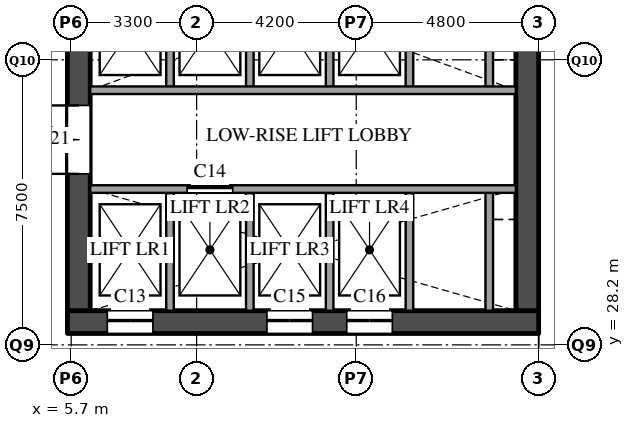
"""IFC4 building model, lengths in metres.
Left out: names, types, materials, properties, quantities, classifications, styles, units other than length and angle.
Written with IfcOpenShell. Run it as: python <this file> out.ifc"""

import sys

from ifc_helpers import new_model, si_unit, direction, frame, frame_2d, origin, place, context, subcontext, project, spatial, rectangle, extrude, element, fill, save


model = new_model("IFC4")
c1 = context("Model", 3, precision=1e-05, world=origin(), true_north=direction((0.0, 1.0)))
c2 = subcontext(c1, "Body", "Model", "MODEL_VIEW")
j1 = project(units=[si_unit("LENGTHUNIT", "METRE"), si_unit("PLANEANGLEUNIT", "RADIAN")], contexts=[c1])
p1 = place(None, origin())
s1 = spatial("IfcSite", under=j1, at=p1, CompositionType="ELEMENT")
p2 = place(p1, origin())
s2 = spatial("IfcBuilding", under=s1, at=p2, CompositionType="ELEMENT")
p3 = place(p2, frame((0.0, 0.0, 8.0)))
s3 = spatial("IfcBuildingStorey", under=s2, at=p3, CompositionType="ELEMENT", Elevation=8.0)
p4 = place(p3, frame((5.6, 28.8, 0.0), z_axis=(0.0, 0.0, 1.0), x_axis=(1.0, 0.0, 0.0)))
e1 = element("IfcWall", 1, at=p4, inside=s3, PredefinedType="SHEAR", context=c2, shape_type="SweptSolid", body=[
    extrude(rectangle(XDim=12.4, YDim=0.6, at=frame_2d((6.2, 0.0))), origin(), (0.0, 0.0, 1.0), 5.59),
])
p5 = place(p4, frame((1.05, 0.0, 0.0)))
e2 = element("IfcOpeningElement", 2, at=p5, cuts=e1, PredefinedType="OPENING", context=c2, shape_type="SweptSolid", body=[
    extrude(rectangle(XDim=1.2, YDim=2.1, at=frame_2d((0.6, 1.05))), frame((0.0, 0.31, 0.0), z_axis=(0.0, -1.0, 0.0), x_axis=(1.0, 0.0, 0.0)), (0.0, 0.0, 1.0), 0.62),
])
p6 = place(p4, frame((5.25, 0.0, 0.0)))
e3 = element("IfcOpeningElement", 3, at=p6, cuts=e1, PredefinedType="OPENING", context=c2, shape_type="SweptSolid", body=[
    extrude(rectangle(XDim=1.2, YDim=2.1, at=frame_2d((0.6, 1.05))), frame((0.0, 0.31, 0.0), z_axis=(0.0, -1.0, 0.0), x_axis=(1.0, 0.0, 0.0)), (0.0, 0.0, 1.0), 0.62),
])
p7 = place(p4, frame((7.35, 0.0, 0.0)))
e4 = element("IfcOpeningElement", 4, at=p7, cuts=e1, PredefinedType="OPENING", context=c2, shape_type="SweptSolid", body=[
    extrude(rectangle(XDim=1.2, YDim=2.1, at=frame_2d((0.6, 1.05))), frame((0.0, 0.31, 0.0), z_axis=(0.0, -1.0, 0.0), x_axis=(1.0, 0.0, 0.0)), (0.0, 0.0, 1.0), 0.62),
])
p8 = place(p3, frame((5.9, 29.1, 0.0), z_axis=(0.0, 0.0, 1.0), x_axis=(0.0, 1.0, 0.0)))
e5 = element("IfcWall", 5, at=p8, inside=s3, PredefinedType="SHEAR", context=c2, shape_type="SweptSolid", body=[
    extrude(rectangle(XDim=20.3, YDim=0.6, at=frame_2d((10.15, 0.0))), origin(), (0.0, 0.0, 1.0), 5.59),
])
p9 = place(p8, frame((3.6, 0.0, 0.0)))
e6 = element("IfcOpeningElement", 6, at=p9, cuts=e5, PredefinedType="OPENING", context=c2, shape_type="SweptSolid", body=[
    extrude(rectangle(XDim=1.8, YDim=2.1, at=frame_2d((0.9, 1.05))), frame((0.0, 0.31, 0.0), z_axis=(0.0, -1.0, 0.0), x_axis=(1.0, 0.0, 0.0)), (0.0, 0.0, 1.0), 0.62),
])
p10 = place(p8, frame((16.4, 0.0, 0.0)))
e7 = element("IfcOpeningElement", 7, at=p10, cuts=e5, PredefinedType="OPENING", context=c2, shape_type="SweptSolid", body=[
    extrude(rectangle(XDim=1.0, YDim=2.1, at=frame_2d((0.5, 1.05))), frame((0.0, 0.31, 0.0), z_axis=(0.0, -1.0, 0.0), x_axis=(1.0, 0.0, 0.0)), (0.0, 0.0, 1.0), 0.62),
])
p11 = place(p3, frame((17.7, 29.1, 0.0), z_axis=(0.0, 0.0, 1.0), x_axis=(0.0, 1.0, 0.0)))
e8 = element("IfcWall", 8, at=p11, inside=s3, PredefinedType="SHEAR", context=c2, shape_type="SweptSolid", body=[
    extrude(rectangle(XDim=20.3, YDim=0.6, at=frame_2d((10.15, 0.0))), origin(), (0.0, 0.0, 1.0), 5.59),
])
p12 = place(p3, frame((8.3, 29.1, 0.0), z_axis=(0.0, 0.0, 1.0), x_axis=(0.0, 1.0, 0.0)))
e9 = element("IfcWall", 9, at=p12, inside=s3, PredefinedType="SOLIDWALL", context=c2, shape_type="SweptSolid", body=[
    extrude(rectangle(XDim=3.2, YDim=0.2, at=frame_2d((1.6, 0.0))), origin(), (0.0, 0.0, 1.0), 5.59),
])
p13 = place(p3, frame((8.3, 34.9, 0.0), z_axis=(0.0, 0.0, 1.0), x_axis=(0.0, 1.0, 0.0)))
e10 = element("IfcWall", 10, at=p13, inside=s3, PredefinedType="SOLIDWALL", context=c2, shape_type="SweptSolid", body=[
    extrude(rectangle(XDim=3.2, YDim=0.2, at=frame_2d((1.6, 0.0))), origin(), (0.0, 0.0, 1.0), 5.59),
])
p14 = place(p3, frame((10.4, 29.1, 0.0), z_axis=(0.0, 0.0, 1.0), x_axis=(0.0, 1.0, 0.0)))
e11 = element("IfcWall", 11, at=p14, inside=s3, PredefinedType="SOLIDWALL", context=c2, shape_type="SweptSolid", body=[
    extrude(rectangle(XDim=3.2, YDim=0.2, at=frame_2d((1.6, 0.0))), origin(), (0.0, 0.0, 1.0), 5.59),
])
p15 = place(p3, frame((10.4, 34.9, 0.0), z_axis=(0.0, 0.0, 1.0), x_axis=(0.0, 1.0, 0.0)))
e12 = element("IfcWall", 12, at=p15, inside=s3, PredefinedType="SOLIDWALL", context=c2, shape_type="SweptSolid", body=[
    extrude(rectangle(XDim=3.2, YDim=0.2, at=frame_2d((1.6, 0.0))), origin(), (0.0, 0.0, 1.0), 5.59),
])
p16 = place(p3, frame((12.5, 29.1, 0.0), z_axis=(0.0, 0.0, 1.0), x_axis=(0.0, 1.0, 0.0)))
e13 = element("IfcWall", 13, at=p16, inside=s3, PredefinedType="SOLIDWALL", context=c2, shape_type="SweptSolid", body=[
    extrude(rectangle(XDim=3.2, YDim=0.2, at=frame_2d((1.6, 0.0))), origin(), (0.0, 0.0, 1.0), 5.59),
])
p17 = place(p3, frame((12.5, 34.9, 0.0), z_axis=(0.0, 0.0, 1.0), x_axis=(0.0, 1.0, 0.0)))
e14 = element("IfcWall", 14, at=p17, inside=s3, PredefinedType="SOLIDWALL", context=c2, shape_type="SweptSolid", body=[
    extrude(rectangle(XDim=3.2, YDim=0.2, at=frame_2d((1.6, 0.0))), origin(), (0.0, 0.0, 1.0), 5.59),
])
p18 = place(p3, frame((14.6, 29.1, 0.0), z_axis=(0.0, 0.0, 1.0), x_axis=(0.0, 1.0, 0.0)))
e15 = element("IfcWall", 15, at=p18, inside=s3, PredefinedType="SOLIDWALL", context=c2, shape_type="SweptSolid", body=[
    extrude(rectangle(XDim=3.2, YDim=0.2, at=frame_2d((1.6, 0.0))), origin(), (0.0, 0.0, 1.0), 5.59),
])
p19 = place(p3, frame((14.6, 34.9, 0.0), z_axis=(0.0, 0.0, 1.0), x_axis=(0.0, 1.0, 0.0)))
e16 = element("IfcWall", 16, at=p19, inside=s3, PredefinedType="SOLIDWALL", context=c2, shape_type="SweptSolid", body=[
    extrude(rectangle(XDim=3.2, YDim=0.2, at=frame_2d((1.6, 0.0))), origin(), (0.0, 0.0, 1.0), 5.59),
])
p20 = place(p3, frame((16.7, 29.1, 0.0), z_axis=(0.0, 0.0, 1.0), x_axis=(0.0, 1.0, 0.0)))
e17 = element("IfcWall", 17, at=p20, inside=s3, PredefinedType="SOLIDWALL", context=c2, shape_type="SweptSolid", body=[
    extrude(rectangle(XDim=3.2, YDim=0.2, at=frame_2d((1.6, 0.0))), origin(), (0.0, 0.0, 1.0), 5.59),
])
p21 = place(p3, frame((16.7, 34.9, 0.0), z_axis=(0.0, 0.0, 1.0), x_axis=(0.0, 1.0, 0.0)))
e18 = element("IfcWall", 18, at=p21, inside=s3, PredefinedType="SOLIDWALL", context=c2, shape_type="SweptSolid", body=[
    extrude(rectangle(XDim=3.2, YDim=0.2, at=frame_2d((1.6, 0.0))), origin(), (0.0, 0.0, 1.0), 5.59),
])
p22 = place(p3, frame((6.2, 32.3, 0.0), z_axis=(0.0, 0.0, 1.0), x_axis=(1.0, 0.0, 0.0)))
e19 = element("IfcWall", 19, at=p22, inside=s3, PredefinedType="SOLIDWALL", context=c2, shape_type="SweptSolid", body=[
    extrude(rectangle(XDim=11.2, YDim=0.2, at=frame_2d((5.6, 0.0))), origin(), (0.0, 0.0, 1.0), 5.59),
])
p23 = place(p22, frame((2.55, 0.0, 0.0)))
e20 = element("IfcOpeningElement", 20, at=p23, cuts=e19, PredefinedType="OPENING", context=c2, shape_type="SweptSolid", body=[
    extrude(rectangle(XDim=1.2, YDim=2.1, at=frame_2d((0.6, 1.05))), frame((0.0, 0.11, 0.0), z_axis=(0.0, -1.0, 0.0), x_axis=(1.0, 0.0, 0.0)), (0.0, 0.0, 1.0), 0.22),
])
p24 = place(p3, frame((6.2, 34.9, 0.0), z_axis=(0.0, 0.0, 1.0), x_axis=(1.0, 0.0, 0.0)))
e21 = element("IfcWall", 21, at=p24, inside=s3, PredefinedType="SOLIDWALL", context=c2, shape_type="SweptSolid", body=[
    extrude(rectangle(XDim=11.2, YDim=0.2, at=frame_2d((5.6, 0.0))), origin(), (0.0, 0.0, 1.0), 5.59),
])
p25 = place(p5, origin())
e22 = element("IfcDoor", 22, at=p25, inside=s3, OperationType="SLIDING_TO_LEFT", PredefinedType="DOOR", context=c2, shape_type="SweptSolid", body=[
    extrude(rectangle(XDim=1.2, YDim=2.1, at=frame_2d((0.6, 1.05))), frame((0.0, 0.025, 0.0), z_axis=(0.0, -1.0, 0.0), x_axis=(1.0, 0.0, 0.0)), (0.0, 0.0, 1.0), 0.05),
])
fill(e2, e22)
p26 = place(p23, origin())
e23 = element("IfcDoor", 23, at=p26, inside=s3, OperationType="SLIDING_TO_LEFT", PredefinedType="DOOR", context=c2, shape_type="SweptSolid", body=[
    extrude(rectangle(XDim=1.2, YDim=2.1, at=frame_2d((0.6, 1.05))), frame((0.0, 0.025, 0.0), z_axis=(0.0, -1.0, 0.0), x_axis=(1.0, 0.0, 0.0)), (0.0, 0.0, 1.0), 0.05),
])
fill(e20, e23)
p27 = place(p6, origin())
e24 = element("IfcDoor", 24, at=p27, inside=s3, OperationType="SLIDING_TO_LEFT", PredefinedType="DOOR", context=c2, shape_type="SweptSolid", body=[
    extrude(rectangle(XDim=1.2, YDim=2.1, at=frame_2d((0.6, 1.05))), frame((0.0, 0.025, 0.0), z_axis=(0.0, -1.0, 0.0), x_axis=(1.0, 0.0, 0.0)), (0.0, 0.0, 1.0), 0.05),
])
fill(e3, e24)
p28 = place(p7, origin())
e25 = element("IfcDoor", 25, at=p28, inside=s3, OperationType="SLIDING_TO_LEFT", PredefinedType="DOOR", context=c2, shape_type="SweptSolid", body=[
    extrude(rectangle(XDim=1.2, YDim=2.1, at=frame_2d((0.6, 1.05))), frame((0.0, 0.025, 0.0), z_axis=(0.0, -1.0, 0.0), x_axis=(1.0, 0.0, 0.0)), (0.0, 0.0, 1.0), 0.05),
])
fill(e4, e25)
p29 = place(p9, origin())
e26 = element("IfcDoor", 26, at=p29, inside=s3, OperationType="DOUBLE_DOOR_SINGLE_SWING", PredefinedType="DOOR", context=c2, shape_type="SweptSolid", body=[
    extrude(rectangle(XDim=1.8, YDim=2.1, at=frame_2d((0.9, 1.05))), frame((0.0, 0.025, 0.0), z_axis=(0.0, -1.0, 0.0), x_axis=(1.0, 0.0, 0.0)), (0.0, 0.0, 1.0), 0.05),
])
fill(e6, e26)
save(model, sys.argv[1])
